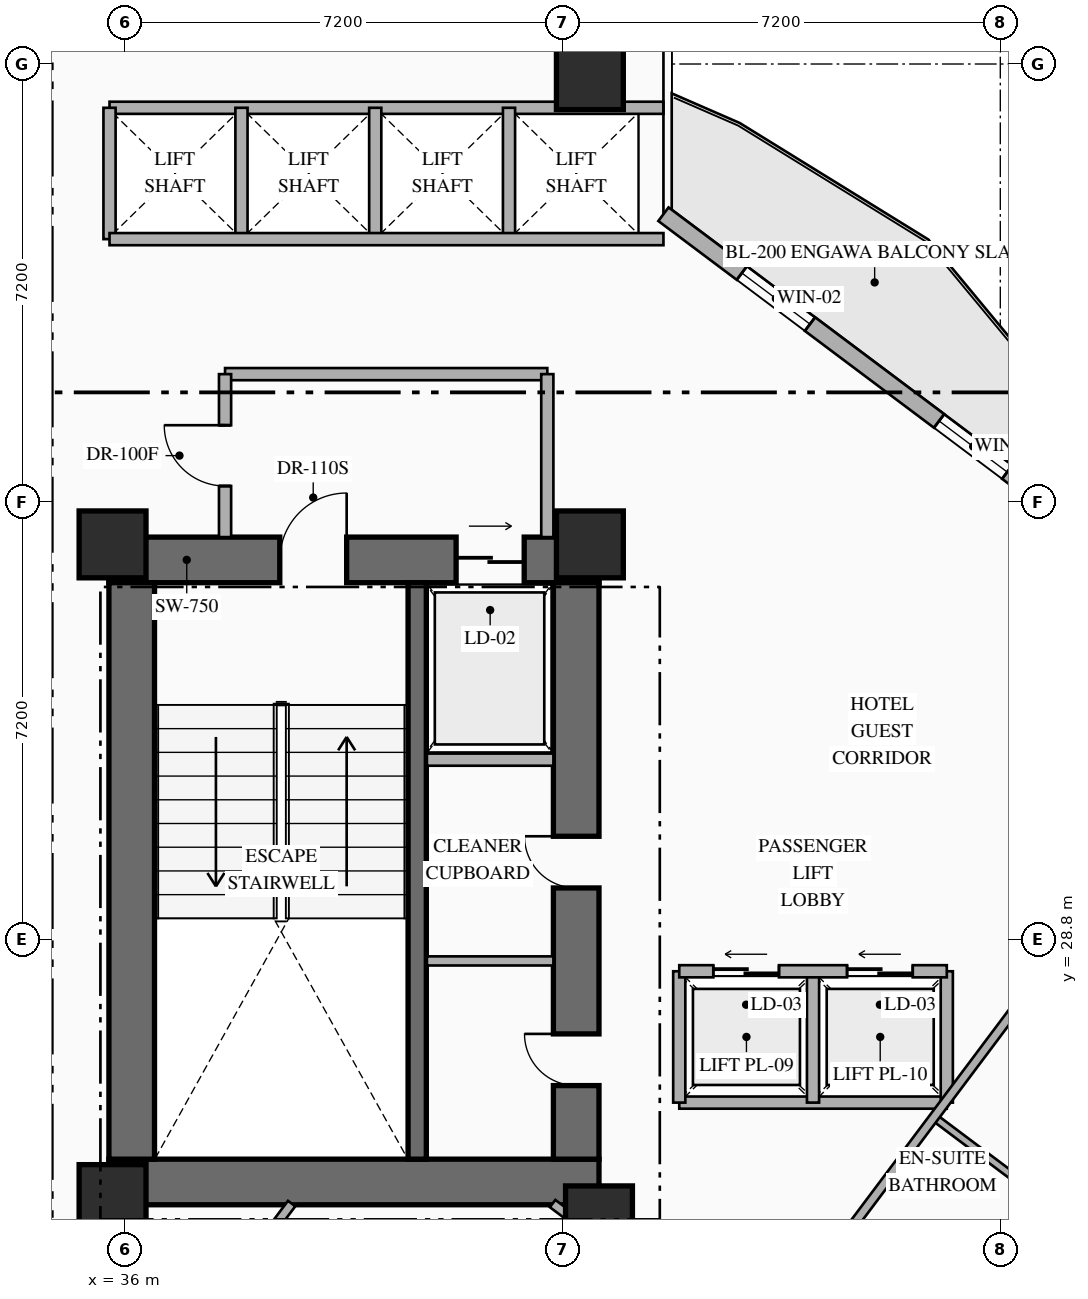
"""IFC4 building model, lengths in metres.
Left out: names, types, materials, properties, quantities, classifications, styles, units other than length and angle.
Written with IfcOpenShell. Run it as: python <this file> out.ifc"""

import sys

from ifc_helpers import new_model, si_unit, direction, frame, frame_2d, origin, origin_2d, place, context, subcontext, project, spatial, rectangle, extrude, element, fill, save


model = new_model("IFC4")
c1 = context("Model", 3, precision=1e-05, world=origin(), true_north=direction((0.0, 1.0)))
c2 = subcontext(c1, "Body", "Model", "MODEL_VIEW")
j1 = project(units=[si_unit("LENGTHUNIT", "METRE"), si_unit("PLANEANGLEUNIT", "RADIAN")], contexts=[c1])
p1 = place(None, origin())
s1 = spatial("IfcSite", under=j1, at=p1, CompositionType="ELEMENT")
p2 = place(p1, origin())
s2 = spatial("IfcBuilding", under=s1, at=p2, CompositionType="ELEMENT")
p3 = place(p2, frame((0.0, 0.0, 88.0)))
s3 = spatial("IfcBuildingStorey", under=s2, at=p3, CompositionType="ELEMENT", Elevation=88.0)
p4 = place(p3, frame((35.74, 24.815, 0.0), z_axis=(0.0, 0.0, 1.0), x_axis=(1.0, 0.0, 0.0)))
e1 = element("IfcWall", 1, at=p4, inside=s3, PredefinedType="SHEAR", context=c2, shape_type="SweptSolid", body=[
    extrude(rectangle(XDim=8.06, YDim=0.75, at=frame_2d((4.03, 0.0))), origin(), (0.0, 0.0, 1.0), 3.35),
])
p5 = place(p3, frame((35.74, 35.045, 0.0), z_axis=(0.0, 0.0, 1.0), x_axis=(1.0, 0.0, 0.0)))
e2 = element("IfcWall", 2, at=p5, inside=s3, PredefinedType="SHEAR", context=c2, shape_type="SweptSolid", body=[
    extrude(rectangle(XDim=8.06, YDim=0.75, at=frame_2d((4.03, 0.0))), origin(), (0.0, 0.0, 1.0), 3.35),
])
p6 = place(p5, frame((2.81, 0.0, 0.0)))
e3 = element("IfcOpeningElement", 3, at=p6, cuts=e2, PredefinedType="OPENING", context=c2, shape_type="SweptSolid", body=[
    extrude(rectangle(XDim=1.1, YDim=2.2, at=frame_2d((0.55, 1.1))), frame((0.0, 0.385, 0.0), z_axis=(0.0, -1.0, 0.0), x_axis=(1.0, 0.0, 0.0)), (0.0, 0.0, 1.0), 0.77),
])
p7 = place(p5, frame((5.71, 0.0, 0.0)))
e4 = element("IfcOpeningElement", 4, at=p7, cuts=e2, PredefinedType="OPENING", context=c2, shape_type="SweptSolid", body=[
    extrude(rectangle(XDim=1.12, YDim=2.15, at=frame_2d((0.56, 1.075))), frame((0.0, 0.385, 0.0), z_axis=(0.0, -1.0, 0.0), x_axis=(1.0, 0.0, 0.0)), (0.0, 0.0, 1.0), 0.77),
])
p8 = place(p3, frame((36.115, 25.19, 0.0), z_axis=(0.0, 0.0, 1.0), x_axis=(0.0, 1.0, 0.0)))
e5 = element("IfcWall", 5, at=p8, inside=s3, PredefinedType="SHEAR", context=c2, shape_type="SweptSolid", body=[
    extrude(rectangle(XDim=9.48, YDim=0.75, at=frame_2d((4.74, 0.0))), origin(), (0.0, 0.0, 1.0), 3.35),
])
p9 = place(p3, frame((43.425, 25.19, 0.0), z_axis=(0.0, 0.0, 1.0), x_axis=(0.0, 1.0, 0.0)))
e6 = element("IfcWall", 6, at=p9, inside=s3, PredefinedType="SHEAR", context=c2, shape_type="SweptSolid", body=[
    extrude(rectangle(XDim=9.48, YDim=0.75, at=frame_2d((4.74, 0.0))), origin(), (0.0, 0.0, 1.0), 3.35),
])
p10 = place(p9, frame((1.21, 0.0, 0.0)))
e7 = element("IfcOpeningElement", 7, at=p10, cuts=e6, PredefinedType="OPENING", context=c2, shape_type="SweptSolid", body=[
    extrude(rectangle(XDim=0.85, YDim=2.08, at=frame_2d((0.425, 1.04))), frame((0.0, 0.385, 0.0), z_axis=(0.0, -1.0, 0.0), x_axis=(1.0, 0.0, 0.0)), (0.0, 0.0, 1.0), 0.77),
])
p11 = place(p9, frame((4.46, 0.0, 0.0)))
e8 = element("IfcOpeningElement", 8, at=p11, cuts=e6, PredefinedType="OPENING", context=c2, shape_type="SweptSolid", body=[
    extrude(rectangle(XDim=0.85, YDim=2.08, at=frame_2d((0.425, 1.04))), frame((0.0, 0.385, 0.0), z_axis=(0.0, -1.0, 0.0), x_axis=(1.0, 0.0, 0.0)), (0.0, 0.0, 1.0), 0.77),
])
p12 = place(p3, frame((40.81, 25.19, 0.0), z_axis=(0.0, 0.0, 1.0), x_axis=(0.0, 1.0, 0.0)))
e9 = element("IfcWall", 9, at=p12, inside=s3, PredefinedType="SHEAR", context=c2, shape_type="SweptSolid", body=[
    extrude(rectangle(XDim=9.48, YDim=0.3, at=frame_2d((4.74, 0.0))), origin(), (0.0, 0.0, 1.0), 3.35),
])
for number, where, z_axis, x_axis in (
    (10, (35.8, 24.55, 0.0), (0.0, 0.0, 1.0), (1.0, 0.0, 0.0)),
    (11, (43.8, 24.2, 0.0), (0.0, 0.0, 1.0), (1.0, 0.0, 0.0)),
    (12, (35.8, 35.3, 0.0), (0.0, 0.0, 1.0), (1.0, 0.0, 0.0)),
    (13, (43.65, 35.3, 0.0), (0.0, 0.0, 1.0), (1.0, 0.0, 0.0)),
    (14, (43.65, 43.0, 0.0), (0.0, 0.0, 1.0), (1.0, 0.0, 0.0)),
):
    element("IfcColumn", number, at=place(p3, frame(where, z_axis=z_axis, x_axis=x_axis)), inside=s3, PredefinedType="COLUMN", context=c2, shape_type="SweptSolid", body=[
        extrude(rectangle(XDim=1.1, YDim=1.1, at=origin_2d()), origin(), (0.0, 0.0, 1.0), 3.35),
    ])
p13 = place(p3, frame((44.86, 40.73, 0.0), z_axis=(0.0, 0.0, 1.0), x_axis=(0.800006902154, -0.599990797017, 0.0)))
e15 = element("IfcWall", 15, at=p13, inside=s3, PredefinedType="STANDARD", context=c2, shape_type="SweptSolid", body=[
    extrude(rectangle(XDim=29.712, YDim=0.28, at=frame_2d((14.856, 0.0))), origin(), (0.0, 0.0, 1.0), 3.05),
])
p14 = place(p13, frame((14.249, 0.0, 0.0)))
e16 = element("IfcOpeningElement", 16, at=p14, cuts=e15, PredefinedType="OPENING", context=c2, shape_type="SweptSolid", body=[
    extrude(rectangle(XDim=1.1, YDim=2.2, at=frame_2d((0.55, 1.1))), frame((0.0, 0.15, 0.0), z_axis=(0.0, -1.0, 0.0), x_axis=(1.0, 0.0, 0.0)), (0.0, 0.0, 1.0), 0.3),
])
p15 = place(p13, frame((1.612, 0.0, 0.85)))
e17 = element("IfcOpeningElement", 17, at=p15, cuts=e15, PredefinedType="OPENING", context=c2, shape_type="SweptSolid", body=[
    extrude(rectangle(XDim=1.4, YDim=1.8, at=frame_2d((0.7, 0.9))), frame((0.0, 0.15, 0.0), z_axis=(0.0, -1.0, 0.0), x_axis=(1.0, 0.0, 0.0)), (0.0, 0.0, 1.0), 0.3),
])
p16 = place(p13, frame((5.667, 0.0, 0.85)))
e18 = element("IfcOpeningElement", 18, at=p16, cuts=e15, PredefinedType="OPENING", context=c2, shape_type="SweptSolid", body=[
    extrude(rectangle(XDim=1.4, YDim=1.8, at=frame_2d((0.7, 0.9))), frame((0.0, 0.15, 0.0), z_axis=(0.0, -1.0, 0.0), x_axis=(1.0, 0.0, 0.0)), (0.0, 0.0, 1.0), 0.3),
])
p17 = place(p13, frame((9.912, 0.0, 0.85)))
e19 = element("IfcOpeningElement", 19, at=p17, cuts=e15, PredefinedType="OPENING", context=c2, shape_type="SweptSolid", body=[
    extrude(rectangle(XDim=1.4, YDim=1.8, at=frame_2d((0.7, 0.9))), frame((0.0, 0.15, 0.0), z_axis=(0.0, -1.0, 0.0), x_axis=(1.0, 0.0, 0.0)), (0.0, 0.0, 1.0), 0.3),
])
p18 = place(p13, frame((19.528, 0.0, 0.85)))
e20 = element("IfcOpeningElement", 20, at=p18, cuts=e15, PredefinedType="OPENING", context=c2, shape_type="SweptSolid", body=[
    extrude(rectangle(XDim=1.4, YDim=1.8, at=frame_2d((0.7, 0.9))), frame((0.0, 0.15, 0.0), z_axis=(0.0, -1.0, 0.0), x_axis=(1.0, 0.0, 0.0)), (0.0, 0.0, 1.0), 0.3),
])
p19 = place(p13, frame((23.451, 0.0, 0.85)))
e21 = element("IfcOpeningElement", 21, at=p19, cuts=e15, PredefinedType="OPENING", context=c2, shape_type="SweptSolid", body=[
    extrude(rectangle(XDim=1.4, YDim=1.8, at=frame_2d((0.7, 0.9))), frame((0.0, 0.15, 0.0), z_axis=(0.0, -1.0, 0.0), x_axis=(1.0, 0.0, 0.0)), (0.0, 0.0, 1.0), 0.3),
])
p20 = place(p13, frame((27.852, 0.0, 0.85)))
e22 = element("IfcOpeningElement", 22, at=p20, cuts=e15, PredefinedType="OPENING", context=c2, shape_type="SweptSolid", body=[
    extrude(rectangle(XDim=1.4, YDim=1.8, at=frame_2d((0.7, 0.9))), frame((0.0, 0.15, 0.0), z_axis=(0.0, -1.0, 0.0), x_axis=(1.0, 0.0, 0.0)), (0.0, 0.0, 1.0), 0.3),
])
p21 = place(p3, frame((40.97, 31.76, 0.0), z_axis=(0.0, 0.0, 1.0), x_axis=(1.0, 0.0, 0.0)))
e23 = element("IfcWall", 23, at=p21, inside=s3, PredefinedType="STANDARD", context=c2, shape_type="SweptSolid", body=[
    extrude(rectangle(XDim=2.08, YDim=0.2, at=frame_2d((1.04, 0.0))), origin(), (0.0, 0.0, 1.0), 3.05),
])
p22 = place(p3, frame((40.97, 28.45, 0.0), z_axis=(0.0, 0.0, 1.0), x_axis=(1.0, 0.0, 0.0)))
e24 = element("IfcWall", 24, at=p22, inside=s3, PredefinedType="PARTITIONING", context=c2, shape_type="SweptSolid", body=[
    extrude(rectangle(XDim=2.08, YDim=0.15, at=frame_2d((1.04, 0.0))), origin(), (0.0, 0.0, 1.0), 3.05),
])
p23 = place(p3, frame((37.65, 38.1, 0.0), z_axis=(0.0, 0.0, 1.0), x_axis=(1.0, 0.0, 0.0)))
e25 = element("IfcWall", 25, at=p23, inside=s3, PredefinedType="STANDARD", context=c2, shape_type="SweptSolid", body=[
    extrude(rectangle(XDim=5.3, YDim=0.2, at=frame_2d((2.65, 0.0))), origin(), (0.0, 0.0, 1.0), 3.05),
])
p24 = place(p3, frame((42.95, 35.42, 0.0), z_axis=(0.0, 0.0, 1.0), x_axis=(0.0, 1.0, 0.0)))
e26 = element("IfcWall", 26, at=p24, inside=s3, PredefinedType="STANDARD", context=c2, shape_type="SweptSolid", body=[
    extrude(rectangle(XDim=2.68, YDim=0.2, at=frame_2d((1.34, 0.0))), origin(), (0.0, 0.0, 1.0), 3.05),
])
p25 = place(p3, frame((37.65, 35.42, 0.0), z_axis=(0.0, 0.0, 1.0), x_axis=(0.0, 1.0, 0.0)))
e27 = element("IfcWall", 27, at=p25, inside=s3, PredefinedType="STANDARD", context=c2, shape_type="SweptSolid", body=[
    extrude(rectangle(XDim=2.68, YDim=0.2, at=frame_2d((1.34, 0.0))), origin(), (0.0, 0.0, 1.0), 3.05),
])
p26 = place(p25, frame((0.84, 0.0, 0.0)))
e28 = element("IfcOpeningElement", 28, at=p26, cuts=e27, PredefinedType="OPENING", context=c2, shape_type="SweptSolid", body=[
    extrude(rectangle(XDim=1.0, YDim=2.2, at=frame_2d((0.5, 1.1))), frame((0.0, 0.11, 0.0), z_axis=(0.0, -1.0, 0.0), x_axis=(1.0, 0.0, 0.0)), (0.0, 0.0, 1.0), 0.22),
])
p27 = place(p3, frame((35.75, 42.48, 0.0), z_axis=(0.0, 0.0, 1.0), x_axis=(1.0, 0.0, 0.0)))
e29 = element("IfcWall", 29, at=p27, inside=s3, PredefinedType="STANDARD", context=c2, shape_type="SweptSolid", body=[
    extrude(rectangle(XDim=9.11, YDim=0.2, at=frame_2d((4.555, 0.0))), origin(), (0.0, 0.0, 1.0), 3.05),
])
for number, where, z_axis, x_axis in (
    (30, (35.75, 40.32, 0.0), (0.0, 0.0, 1.0), (0.0, 1.0, 0.0)),
    (31, (37.92, 40.32, 0.0), (0.0, 0.0, 1.0), (0.0, 1.0, 0.0)),
    (32, (40.12, 40.32, 0.0), (0.0, 0.0, 1.0), (0.0, 1.0, 0.0)),
    (33, (42.32, 40.32, 0.0), (0.0, 0.0, 1.0), (0.0, 1.0, 0.0)),
):
    element("IfcWall", number, at=place(p3, frame(where, z_axis=z_axis, x_axis=x_axis)), inside=s3, PredefinedType="STANDARD", context=c2, shape_type="SweptSolid", body=[
        extrude(rectangle(XDim=2.16, YDim=0.2, at=frame_2d((1.08, 0.0))), origin(), (0.0, 0.0, 1.0), 3.05),
    ])
p28 = place(p3, frame((35.75, 40.32, 0.0), z_axis=(0.0, 0.0, 1.0), x_axis=(1.0, 0.0, 0.0)))
e34 = element("IfcWall", 34, at=p28, inside=s3, PredefinedType="STANDARD", context=c2, shape_type="SweptSolid", body=[
    extrude(rectangle(XDim=9.11, YDim=0.2, at=frame_2d((4.555, 0.0))), origin(), (0.0, 0.0, 1.0), 3.05),
])
p29 = place(p3, frame((45.12, 26.12, 0.0), z_axis=(0.0, 0.0, 1.0), x_axis=(1.0, 0.0, 0.0)))
e35 = element("IfcWall", 35, at=p29, inside=s3, PredefinedType="STANDARD", context=c2, shape_type="SweptSolid", body=[
    extrude(rectangle(XDim=4.4, YDim=0.2, at=frame_2d((2.2, 0.0))), origin(), (0.0, 0.0, 1.0), 3.05),
])
for number, where, z_axis, x_axis in (
    (36, (45.12, 26.12, 0.0), (0.0, 0.0, 1.0), (0.0, 1.0, 0.0)),
    (37, (49.52, 26.12, 0.0), (0.0, 0.0, 1.0), (0.0, 1.0, 0.0)),
    (38, (47.32, 26.12, 0.0), (0.0, 0.0, 1.0), (0.0, 1.0, 0.0)),
):
    element("IfcWall", number, at=place(p3, frame(where, z_axis=z_axis, x_axis=x_axis)), inside=s3, PredefinedType="STANDARD", context=c2, shape_type="SweptSolid", body=[
        extrude(rectangle(XDim=2.16, YDim=0.2, at=frame_2d((1.08, 0.0))), origin(), (0.0, 0.0, 1.0), 3.05),
    ])
p30 = place(p3, frame((45.12, 28.28, 0.0), z_axis=(0.0, 0.0, 1.0), x_axis=(1.0, 0.0, 0.0)))
e39 = element("IfcWall", 39, at=p30, inside=s3, PredefinedType="STANDARD", context=c2, shape_type="SweptSolid", body=[
    extrude(rectangle(XDim=4.4, YDim=0.2, at=frame_2d((2.2, 0.0))), origin(), (0.0, 0.0, 1.0), 3.05),
])
p31 = place(p30, frame((0.56, 0.0, 0.0)))
e40 = element("IfcOpeningElement", 40, at=p31, cuts=e39, PredefinedType="OPENING", context=c2, shape_type="SweptSolid", body=[
    extrude(rectangle(XDim=1.08, YDim=2.15, at=frame_2d((0.54, 1.075))), frame((0.0, 0.11, 0.0), z_axis=(0.0, -1.0, 0.0), x_axis=(1.0, 0.0, 0.0)), (0.0, 0.0, 1.0), 0.22),
])
p32 = place(p30, frame((2.76, 0.0, 0.0)))
e41 = element("IfcOpeningElement", 41, at=p32, cuts=e39, PredefinedType="OPENING", context=c2, shape_type="SweptSolid", body=[
    extrude(rectangle(XDim=1.08, YDim=2.15, at=frame_2d((0.54, 1.075))), frame((0.0, 0.11, 0.0), z_axis=(0.0, -1.0, 0.0), x_axis=(1.0, 0.0, 0.0)), (0.0, 0.0, 1.0), 0.22),
])
p33 = place(p3, frame((43.037, 24.46, 0.0), z_axis=(0.0, 0.0, 1.0), x_axis=(0.799971872363, -0.600037501685, 0.0)))
e42 = element("IfcWall", 42, at=p33, inside=s3, PredefinedType="PARTITIONING", context=c2, shape_type="SweptSolid", body=[
    extrude(rectangle(XDim=4.167, YDim=0.15, at=frame_2d((2.083, 0.0))), origin(), (0.0, 0.0, 1.0), 2.345),
])
p34 = place(p33, frame((2.468, 0.0, 0.0)))
e43 = element("IfcOpeningElement", 43, at=p34, cuts=e42, PredefinedType="OPENING", context=c2, shape_type="SweptSolid", body=[
    extrude(rectangle(XDim=0.95, YDim=2.15, at=frame_2d((0.475, 1.075))), frame((0.0, 0.085, 0.0), z_axis=(0.0, -1.0, 0.0), x_axis=(1.0, 0.0, 0.0)), (0.0, 0.0, 1.0), 0.17),
])
p35 = place(p3, frame((33.384, 17.312, 0.0), z_axis=(0.0, 0.0, 1.0), x_axis=(0.600008743659, 0.799993442181, 0.0)))
e44 = element("IfcWall", 44, at=p35, inside=s3, PredefinedType="PARTITIONING", context=c2, shape_type="SweptSolid", body=[
    extrude(rectangle(XDim=8.935, YDim=0.15, at=frame_2d((4.468, 0.0))), origin(), (0.0, 0.0, 1.0), 3.05),
])
p36 = place(p3, frame((49.59, 22.67, 0.0), z_axis=(0.0, 0.0, 1.0), x_axis=(0.599951172744, 0.800036618114, 0.0)))
e45 = element("IfcWall", 45, at=p36, inside=s3, PredefinedType="PARTITIONING", context=c2, shape_type="SweptSolid", body=[
    extrude(rectangle(XDim=2.4, YDim=0.12, at=frame_2d((1.2, 0.0))), origin(), (0.0, 0.0, 1.0), 3.05),
])
p37 = place(p36, frame((0.8, 0.0, 0.0)))
e46 = element("IfcOpeningElement", 46, at=p37, cuts=e45, PredefinedType="OPENING", context=c2, shape_type="SweptSolid", body=[
    extrude(rectangle(XDim=0.8, YDim=2.06, at=frame_2d((0.4, 1.03))), frame((0.0, 0.07, 0.0), z_axis=(0.0, -1.0, 0.0), x_axis=(1.0, 0.0, 0.0)), (0.0, 0.0, 1.0), 0.14),
])
p38 = place(p3, frame((49.31, 25.88, 0.0), z_axis=(0.0, 0.0, 1.0), x_axis=(0.800040880289, -0.59994548908, 0.0)))
e47 = element("IfcWall", 47, at=p38, inside=s3, PredefinedType="PARTITIONING", context=c2, shape_type="SweptSolid", body=[
    extrude(rectangle(XDim=2.15, YDim=0.12, at=frame_2d((1.075, 0.0))), origin(), (0.0, 0.0, 1.0), 3.05),
])
p39 = place(p3, frame((47.87, 23.96, 0.0), z_axis=(0.0, 0.0, 1.0), x_axis=(0.599996617946, 0.80000253653, 0.0)))
e48 = element("IfcWall", 48, at=p39, inside=s3, PredefinedType="PARTITIONING", context=c2, shape_type="SweptSolid", body=[
    extrude(rectangle(XDim=11.55, YDim=0.15, at=frame_2d((5.775, 0.0))), origin(), (0.0, 0.0, 1.0), 3.05),
])
p40 = place(p15, origin())
e49 = element("IfcWindow", 49, at=p40, inside=s3, PartitioningType="SINGLE_PANEL", PredefinedType="WINDOW", context=c2, shape_type="SweptSolid", body=[
    extrude(rectangle(XDim=1.4, YDim=1.8, at=frame_2d((0.7, 0.9))), frame((0.0, 0.03, 0.0), z_axis=(0.0, -1.0, 0.0), x_axis=(1.0, 0.0, 0.0)), (0.0, 0.0, 1.0), 0.06),
])
fill(e17, e49)
p41 = place(p16, origin())
e50 = element("IfcWindow", 50, at=p41, inside=s3, PartitioningType="SINGLE_PANEL", PredefinedType="WINDOW", context=c2, shape_type="SweptSolid", body=[
    extrude(rectangle(XDim=1.4, YDim=1.8, at=frame_2d((0.7, 0.9))), frame((0.0, 0.03, 0.0), z_axis=(0.0, -1.0, 0.0), x_axis=(1.0, 0.0, 0.0)), (0.0, 0.0, 1.0), 0.06),
])
fill(e18, e50)
p42 = place(p6, origin())
e51 = element("IfcDoor", 51, at=p42, inside=s3, OperationType="SINGLE_SWING_RIGHT", PredefinedType="DOOR", context=c2, shape_type="SweptSolid", body=[
    extrude(rectangle(XDim=1.1, YDim=2.2, at=frame_2d((0.55, 1.1))), frame((0.0, 0.025, 0.0), z_axis=(0.0, -1.0, 0.0), x_axis=(1.0, 0.0, 0.0)), (0.0, 0.0, 1.0), 0.05),
])
fill(e3, e51)
p43 = place(p7, origin())
e52 = element("IfcDoor", 52, at=p43, inside=s3, OperationType="SLIDING_TO_RIGHT", PredefinedType="USERDEFINED", context=c2, shape_type="SweptSolid", body=[
    extrude(rectangle(XDim=1.12, YDim=2.15, at=frame_2d((0.56, 1.075))), frame((0.0, 0.025, 0.0), z_axis=(0.0, -1.0, 0.0), x_axis=(1.0, 0.0, 0.0)), (0.0, 0.0, 1.0), 0.05),
])
fill(e4, e52)
p44 = place(p10, origin())
e53 = element("IfcDoor", 53, at=p44, inside=s3, OperationType="SINGLE_SWING_RIGHT", PredefinedType="DOOR", context=c2, shape_type="SweptSolid", body=[
    extrude(rectangle(XDim=0.85, YDim=2.08, at=frame_2d((0.425, 1.04))), frame((0.0, 0.025, 0.0), z_axis=(0.0, -1.0, 0.0), x_axis=(1.0, 0.0, 0.0)), (0.0, 0.0, 1.0), 0.05),
])
fill(e7, e53)
p45 = place(p11, origin())
e54 = element("IfcDoor", 54, at=p45, inside=s3, OperationType="SINGLE_SWING_RIGHT", PredefinedType="DOOR", context=c2, shape_type="SweptSolid", body=[
    extrude(rectangle(XDim=0.85, YDim=2.08, at=frame_2d((0.425, 1.04))), frame((0.0, 0.025, 0.0), z_axis=(0.0, -1.0, 0.0), x_axis=(1.0, 0.0, 0.0)), (0.0, 0.0, 1.0), 0.05),
])
fill(e8, e54)
p46 = place(p26, origin())
e55 = element("IfcDoor", 55, at=p46, inside=s3, OperationType="SINGLE_SWING_RIGHT", PredefinedType="DOOR", context=c2, shape_type="SweptSolid", body=[
    extrude(rectangle(XDim=1.0, YDim=2.2, at=frame_2d((0.5, 1.1))), frame((0.0, 0.025, 0.0), z_axis=(0.0, -1.0, 0.0), x_axis=(1.0, 0.0, 0.0)), (0.0, 0.0, 1.0), 0.05),
])
fill(e28, e55)
p47 = place(p31, origin())
e56 = element("IfcDoor", 56, at=p47, inside=s3, OperationType="SLIDING_TO_LEFT", PredefinedType="USERDEFINED", context=c2, shape_type="SweptSolid", body=[
    extrude(rectangle(XDim=1.08, YDim=2.15, at=frame_2d((0.54, 1.075))), frame((0.0, 0.025, 0.0), z_axis=(0.0, -1.0, 0.0), x_axis=(1.0, 0.0, 0.0)), (0.0, 0.0, 1.0), 0.05),
])
fill(e40, e56)
p48 = place(p32, origin())
e57 = element("IfcDoor", 57, at=p48, inside=s3, OperationType="SLIDING_TO_LEFT", PredefinedType="USERDEFINED", context=c2, shape_type="SweptSolid", body=[
    extrude(rectangle(XDim=1.08, YDim=2.15, at=frame_2d((0.54, 1.075))), frame((0.0, 0.025, 0.0), z_axis=(0.0, -1.0, 0.0), x_axis=(1.0, 0.0, 0.0)), (0.0, 0.0, 1.0), 0.05),
])
fill(e41, e57)
save(model, sys.argv[1])
